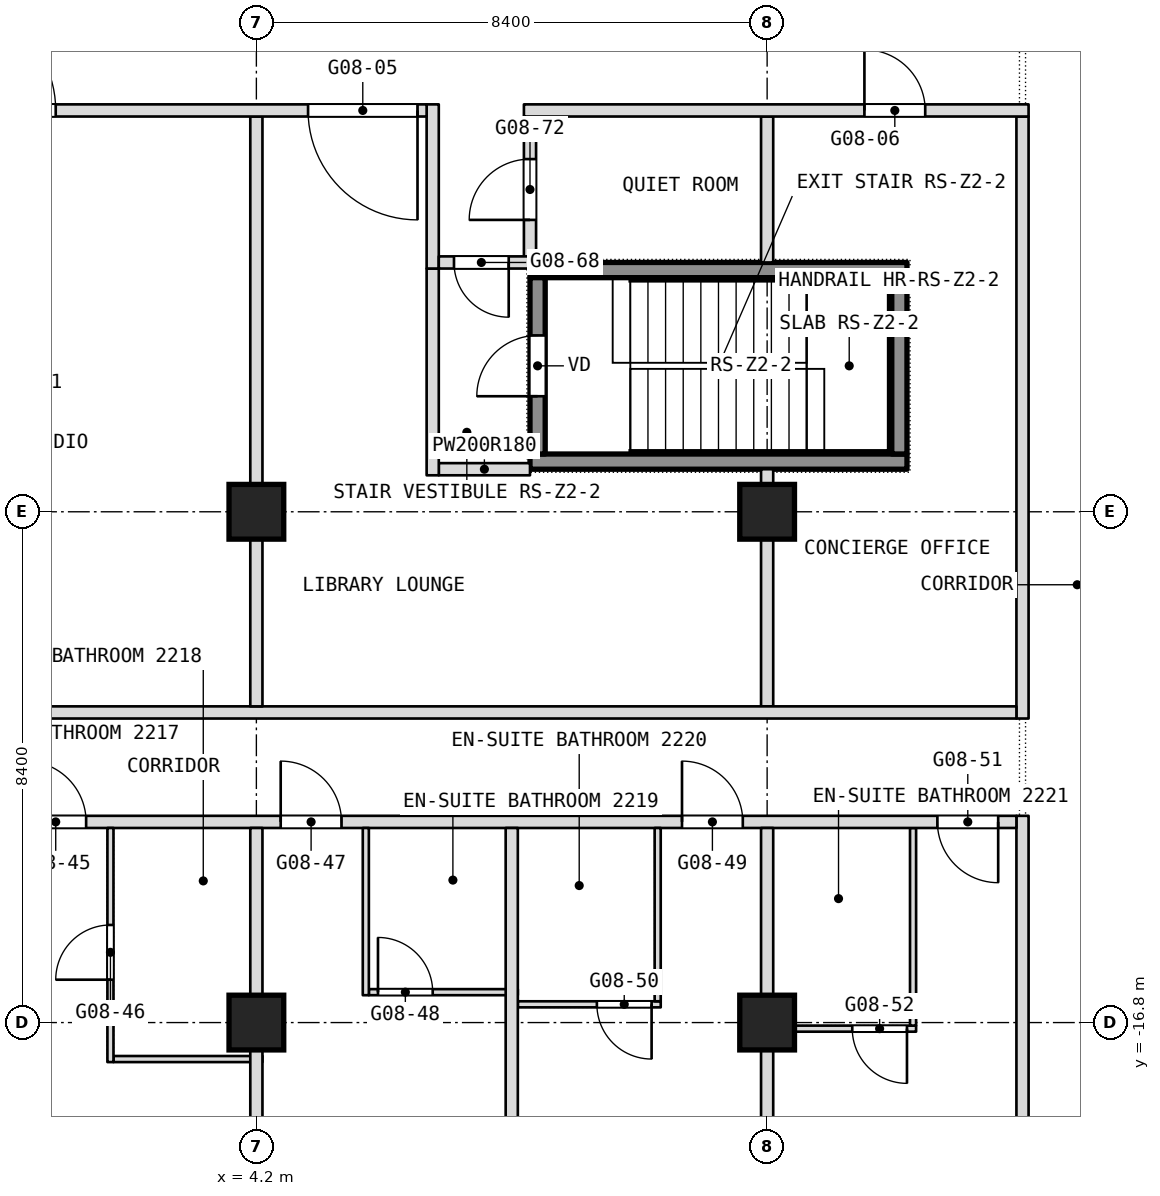
"""IFC4 building model, lengths in metres.
Left out: names, types, materials, properties, quantities, classifications, styles, units other than length and angle.
Written with IfcOpenShell. Run it as: python <this file> out.ifc"""

import sys

from ifc_helpers import new_model, si_unit, direction, frame, frame_2d, origin, origin_2d, place, context, subcontext, project, spatial, rectangle, extrude, element, fill, save


model = new_model("IFC4")
c1 = context("Model", 3, precision=1e-05, world=origin(), true_north=direction((0.0, 1.0)))
c2 = subcontext(c1, "Body", "Model", "MODEL_VIEW")
j1 = project(units=[si_unit("LENGTHUNIT", "METRE"), si_unit("PLANEANGLEUNIT", "RADIAN")], contexts=[c1])
p1 = place(None, origin())
s1 = spatial("IfcSite", under=j1, at=p1, CompositionType="ELEMENT")
p2 = place(p1, origin())
s2 = spatial("IfcBuilding", under=s1, at=p2, CompositionType="ELEMENT")
p3 = place(p2, frame((0.0, 0.0, 104.9)))
s3 = spatial("IfcBuildingStorey", under=s2, at=p3, CompositionType="ELEMENT", Elevation=104.9)
for number, where, z_axis, x_axis in (
    (1, (4.2, -16.8, 0.0), (0.0, 0.0, 1.0), (1.0, 0.0, 0.0)),
    (2, (4.2, -8.4, 0.0), (0.0, 0.0, 1.0), (1.0, 0.0, 0.0)),
    (3, (12.6, -16.8, 0.0), (0.0, 0.0, 1.0), (1.0, 0.0, 0.0)),
    (4, (12.6, -8.4, 0.0), (0.0, 0.0, 1.0), (1.0, 0.0, 0.0)),
):
    element("IfcColumn", number, at=place(p3, frame(where, z_axis=z_axis, x_axis=x_axis)), inside=s3, PredefinedType="COLUMN", context=c2, shape_type="SweptSolid", body=[
        extrude(rectangle(XDim=0.9, YDim=0.9, at=origin_2d()), origin(), (0.0, 0.0, 1.0), 3.6),
    ])
p4 = place(p3, frame((1.85, -17.4, 0.0), z_axis=(0.0, 0.0, 1.0), x_axis=(1.0, 0.0, 0.0)))
e5 = element("IfcWall", 5, at=p4, inside=s3, PredefinedType="PARTITIONING", context=c2, shape_type="SweptSolid", body=[
    extrude(rectangle(XDim=2.45, YDim=0.1, at=frame_2d((1.225, 0.0))), origin(), (0.0, 0.0, 1.0), 3.34),
])
p5 = place(p3, frame((12.7, -16.9, 0.0), z_axis=(0.0, 0.0, 1.0), x_axis=(1.0, 0.0, 0.0)))
e6 = element("IfcWall", 6, at=p5, inside=s3, PredefinedType="PARTITIONING", context=c2, shape_type="SweptSolid", body=[
    extrude(rectangle(XDim=2.35, YDim=0.1, at=frame_2d((1.175, 0.0))), origin(), (0.0, 0.0, 1.0), 2.89),
])
p6 = place(p5, frame((1.3, 0.0, 0.0)))
e7 = element("IfcOpeningElement", 7, at=p6, cuts=e6, PredefinedType="OPENING", context=c2, shape_type="SweptSolid", body=[
    extrude(rectangle(XDim=0.9, YDim=2.1, at=frame_2d((0.45, 1.05))), frame((0.0, 0.05, 0.0), z_axis=(0.0, -1.0, 0.0), x_axis=(1.0, 0.0, 0.0)), (0.0, 0.0, 1.0), 0.1),
])
p7 = place(p3, frame((16.8, -22.186, 0.0), z_axis=(0.0, 0.0, 1.0), x_axis=(0.0, 1.0, 0.0)))
e8 = element("IfcWall", 8, at=p7, inside=s3, PredefinedType="PARTITIONING", context=c2, shape_type="SweptSolid", body=[
    extrude(rectangle(XDim=8.786, YDim=0.2, at=frame_2d((4.393, 0.0))), origin(), (0.0, 0.0, 1.0), 3.34),
])
p8 = place(p3, frame((16.8, -11.8, 0.0), z_axis=(0.0, 0.0, 1.0), x_axis=(0.0, 1.0, 0.0)))
e9 = element("IfcWall", 9, at=p8, inside=s3, PredefinedType="PARTITIONING", context=c2, shape_type="SweptSolid", body=[
    extrude(rectangle(XDim=9.9, YDim=0.2, at=frame_2d((4.95, 0.0))), origin(), (0.0, 0.0, 1.0), 3.34),
])
p9 = place(p3, frame((8.5, -16.5, 0.0), z_axis=(0.0, 0.0, 1.0), x_axis=(1.0, 0.0, 0.0)))
e10 = element("IfcWall", 10, at=p9, inside=s3, PredefinedType="PARTITIONING", context=c2, shape_type="SweptSolid", body=[
    extrude(rectangle(XDim=2.35, YDim=0.1, at=frame_2d((1.175, 0.0))), origin(), (0.0, 0.0, 1.0), 3.34),
])
p10 = place(p9, frame((1.3, 0.0, 0.0)))
e11 = element("IfcOpeningElement", 11, at=p10, cuts=e10, PredefinedType="OPENING", context=c2, shape_type="SweptSolid", body=[
    extrude(rectangle(XDim=0.9, YDim=2.1, at=frame_2d((0.45, 1.05))), frame((0.0, 0.05, 0.0), z_axis=(0.0, -1.0, 0.0), x_axis=(1.0, 0.0, 0.0)), (0.0, 0.0, 1.0), 0.1),
])
p11 = place(p3, frame((6.05, -16.3, 0.0), z_axis=(0.0, 0.0, 1.0), x_axis=(1.0, 0.0, 0.0)))
e12 = element("IfcWall", 12, at=p11, inside=s3, PredefinedType="PARTITIONING", context=c2, shape_type="SweptSolid", body=[
    extrude(rectangle(XDim=2.45, YDim=0.1, at=frame_2d((1.225, 0.0))), origin(), (0.0, 0.0, 1.0), 3.34),
])
p12 = place(p11, frame((0.15, 0.0, 0.0)))
e13 = element("IfcOpeningElement", 13, at=p12, cuts=e12, PredefinedType="OPENING", context=c2, shape_type="SweptSolid", body=[
    extrude(rectangle(XDim=0.9, YDim=2.1, at=frame_2d((0.45, 1.05))), frame((0.0, 0.05, 0.0), z_axis=(0.0, -1.0, 0.0), x_axis=(1.0, 0.0, 0.0)), (0.0, 0.0, 1.0), 0.1),
])
p13 = place(p3, frame((15.0, -16.85, 0.0), z_axis=(0.0, 0.0, 1.0), x_axis=(0.0, 1.0, 0.0)))
e14 = element("IfcWall", 14, at=p13, inside=s3, PredefinedType="PARTITIONING", context=c2, shape_type="SweptSolid", body=[
    extrude(rectangle(XDim=3.25, YDim=0.1, at=frame_2d((1.625, 0.0))), origin(), (0.0, 0.0, 1.0), 3.34),
])
p14 = place(p3, frame((-3.2, -13.5, 0.0), z_axis=(0.0, 0.0, 1.0), x_axis=(1.0, 0.0, 0.0)))
e15 = element("IfcWall", 15, at=p14, inside=s3, PredefinedType="PARTITIONING", context=c2, shape_type="SweptSolid", body=[
    extrude(rectangle(XDim=19.9, YDim=0.2, at=frame_2d((9.95, 0.0))), origin(), (0.0, 0.0, 1.0), 3.34),
])
p15 = place(p14, frame((1.8, 0.0, 0.0)))
e16 = element("IfcOpeningElement", 16, at=p15, cuts=e15, PredefinedType="OPENING", context=c2, shape_type="SweptSolid", body=[
    extrude(rectangle(XDim=1.0, YDim=2.1, at=frame_2d((0.5, 1.05))), frame((0.0, 0.1, 0.0), z_axis=(0.0, -1.0, 0.0), x_axis=(1.0, 0.0, 0.0)), (0.0, 0.0, 1.0), 0.2),
])
p16 = place(p14, frame((3.6, 0.0, 0.0)))
e17 = element("IfcOpeningElement", 17, at=p16, cuts=e15, PredefinedType="OPENING", context=c2, shape_type="SweptSolid", body=[
    extrude(rectangle(XDim=1.0, YDim=2.1, at=frame_2d((0.5, 1.05))), frame((0.0, 0.1, 0.0), z_axis=(0.0, -1.0, 0.0), x_axis=(1.0, 0.0, 0.0)), (0.0, 0.0, 1.0), 0.2),
])
p17 = place(p14, frame((7.8, 0.0, 0.0)))
e18 = element("IfcOpeningElement", 18, at=p17, cuts=e15, PredefinedType="OPENING", context=c2, shape_type="SweptSolid", body=[
    extrude(rectangle(XDim=1.0, YDim=2.1, at=frame_2d((0.5, 1.05))), frame((0.0, 0.1, 0.0), z_axis=(0.0, -1.0, 0.0), x_axis=(1.0, 0.0, 0.0)), (0.0, 0.0, 1.0), 0.2),
])
p18 = place(p14, frame((14.4, 0.0, 0.0)))
e19 = element("IfcOpeningElement", 19, at=p18, cuts=e15, PredefinedType="OPENING", context=c2, shape_type="SweptSolid", body=[
    extrude(rectangle(XDim=1.0, YDim=2.1, at=frame_2d((0.5, 1.05))), frame((0.0, 0.1, 0.0), z_axis=(0.0, -1.0, 0.0), x_axis=(1.0, 0.0, 0.0)), (0.0, 0.0, 1.0), 0.2),
])
p19 = place(p14, frame((18.6, 0.0, 0.0)))
e20 = element("IfcOpeningElement", 20, at=p19, cuts=e15, PredefinedType="OPENING", context=c2, shape_type="SweptSolid", body=[
    extrude(rectangle(XDim=1.0, YDim=2.1, at=frame_2d((0.5, 1.05))), frame((0.0, 0.1, 0.0), z_axis=(0.0, -1.0, 0.0), x_axis=(1.0, 0.0, 0.0)), (0.0, 0.0, 1.0), 0.2),
])
p20 = place(p3, frame((12.6, -21.175, 0.0), z_axis=(0.0, 0.0, 1.0), x_axis=(0.0, 1.0, 0.0)))
e21 = element("IfcWall", 21, at=p20, inside=s3, PredefinedType="PARTITIONING", context=c2, shape_type="SweptSolid", body=[
    extrude(rectangle(XDim=7.575, YDim=0.2, at=frame_2d((3.788, 0.0))), origin(), (0.0, 0.0, 1.0), 3.34),
])
p21 = place(p3, frame((12.6, -11.6, 0.0), z_axis=(0.0, 0.0, 1.0), x_axis=(0.0, 1.0, 0.0)))
e22 = element("IfcWall", 22, at=p21, inside=s3, PredefinedType="PARTITIONING", context=c2, shape_type="SweptSolid", body=[
    extrude(rectangle(XDim=3.9, YDim=0.2, at=frame_2d((1.95, 0.0))), origin(), (0.0, 0.0, 1.0), 3.34),
])
p22 = place(p3, frame((12.6, -4.3, 0.0), z_axis=(0.0, 0.0, 1.0), x_axis=(0.0, 1.0, 0.0)))
e23 = element("IfcWall", 23, at=p22, inside=s3, PredefinedType="PARTITIONING", context=c2, shape_type="SweptSolid", body=[
    extrude(rectangle(XDim=2.4, YDim=0.2, at=frame_2d((1.2, 0.0))), origin(), (0.0, 0.0, 1.0), 3.34),
])
p23 = place(p3, frame((-4.1, -11.7, 0.0), z_axis=(0.0, 0.0, 1.0), x_axis=(1.0, 0.0, 0.0)))
e24 = element("IfcWall", 24, at=p23, inside=s3, PredefinedType="PARTITIONING", context=c2, shape_type="SweptSolid", body=[
    extrude(rectangle(XDim=20.8, YDim=0.2, at=frame_2d((10.4, 0.0))), origin(), (0.0, 0.0, 1.0), 3.34),
])
p24 = place(p3, frame((10.8, -16.45, 0.0), z_axis=(0.0, 0.0, 1.0), x_axis=(0.0, 1.0, 0.0)))
e25 = element("IfcWall", 25, at=p24, inside=s3, PredefinedType="PARTITIONING", context=c2, shape_type="SweptSolid", body=[
    extrude(rectangle(XDim=2.85, YDim=0.1, at=frame_2d((1.425, 0.0))), origin(), (0.0, 0.0, 1.0), 3.34),
])
p25 = place(p3, frame((8.7, -4.3, 0.0), z_axis=(0.0, 0.0, 1.0), x_axis=(0.0, 1.0, 0.0)))
e26 = element("IfcWall", 26, at=p25, inside=s3, PredefinedType="PARTITIONING", context=c2, shape_type="SweptSolid", body=[
    extrude(rectangle(XDim=2.4, YDim=0.2, at=frame_2d((1.2, 0.0))), origin(), (0.0, 0.0, 1.0), 3.34),
])
p26 = place(p25, frame((0.7, 0.0, 0.0)))
e27 = element("IfcOpeningElement", 27, at=p26, cuts=e26, PredefinedType="OPENING", context=c2, shape_type="SweptSolid", body=[
    extrude(rectangle(XDim=1.0, YDim=2.1, at=frame_2d((0.5, 1.05))), frame((0.0, 0.1, 0.0), z_axis=(0.0, -1.0, 0.0), x_axis=(1.0, 0.0, 0.0)), (0.0, 0.0, 1.0), 0.2),
])
p27 = place(p3, frame((8.4, -23.3, 0.0), z_axis=(0.0, 0.0, 1.0), x_axis=(0.0, 1.0, 0.0)))
e28 = element("IfcWall", 28, at=p27, inside=s3, PredefinedType="PARTITIONING", context=c2, shape_type="SweptSolid", body=[
    extrude(rectangle(XDim=9.7, YDim=0.2, at=frame_2d((4.85, 0.0))), origin(), (0.0, 0.0, 1.0), 3.34),
])
p28 = place(p3, frame((7.2, -7.7, 0.0), z_axis=(0.0, 0.0, 1.0), x_axis=(1.0, 0.0, 0.0)))
e29 = element("IfcWall", 29, at=p28, inside=s3, PredefinedType="PARTITIONING", context=c2, shape_type="SweptSolid", body=[
    extrude(rectangle(XDim=1.5, YDim=0.2, at=frame_2d((0.75, 0.0))), origin(), (0.0, 0.0, 1.0), 3.34),
])
p29 = place(p3, frame((7.1, -7.8, 0.0), z_axis=(0.0, 0.0, 1.0), x_axis=(0.0, 1.0, 0.0)))
e30 = element("IfcWall", 30, at=p29, inside=s3, PredefinedType="PARTITIONING", context=c2, shape_type="SweptSolid", body=[
    extrude(rectangle(XDim=3.4, YDim=0.2, at=frame_2d((1.7, 0.0))), origin(), (0.0, 0.0, 1.0), 3.34),
])
p30 = place(p3, frame((7.1, -4.4, 0.0), z_axis=(0.0, 0.0, 1.0), x_axis=(0.0, 1.0, 0.0)))
e31 = element("IfcWall", 31, at=p30, inside=s3, PredefinedType="PARTITIONING", context=c2, shape_type="SweptSolid", body=[
    extrude(rectangle(XDim=2.7, YDim=0.2, at=frame_2d((1.35, 0.0))), origin(), (0.0, 0.0, 1.0), 3.34),
])
p31 = place(p3, frame((6.0, -16.35, 0.0), z_axis=(0.0, 0.0, 1.0), x_axis=(0.0, 1.0, 0.0)))
e32 = element("IfcWall", 32, at=p31, inside=s3, PredefinedType="PARTITIONING", context=c2, shape_type="SweptSolid", body=[
    extrude(rectangle(XDim=2.75, YDim=0.1, at=frame_2d((1.375, 0.0))), origin(), (0.0, 0.0, 1.0), 3.34),
])
p32 = place(p3, frame((7.2, -4.3, 0.0), z_axis=(0.0, 0.0, 1.0), x_axis=(1.0, 0.0, 0.0)))
e33 = element("IfcWall", 33, at=p32, inside=s3, PredefinedType="PARTITIONING", context=c2, shape_type="SweptSolid", body=[
    extrude(rectangle(XDim=1.5, YDim=0.2, at=frame_2d((0.75, 0.0))), origin(), (0.0, 0.0, 1.0), 3.34),
])
p33 = place(p32, frame((0.25, 0.0, 0.0)))
e34 = element("IfcOpeningElement", 34, at=p33, cuts=e33, PredefinedType="OPENING", context=c2, shape_type="SweptSolid", body=[
    extrude(rectangle(XDim=0.9, YDim=2.1, at=frame_2d((0.45, 1.05))), frame((0.0, 0.1, 0.0), z_axis=(0.0, -1.0, 0.0), x_axis=(1.0, 0.0, 0.0)), (0.0, 0.0, 1.0), 0.2),
])
p34 = place(p3, frame((4.2, -23.3, 0.0), z_axis=(0.0, 0.0, 1.0), x_axis=(0.0, 1.0, 0.0)))
e35 = element("IfcWall", 35, at=p34, inside=s3, PredefinedType="PARTITIONING", context=c2, shape_type="SweptSolid", body=[
    extrude(rectangle(XDim=9.7, YDim=0.2, at=frame_2d((4.85, 0.0))), origin(), (0.0, 0.0, 1.0), 3.34),
])
p35 = place(p3, frame((4.2, -11.6, 0.0), z_axis=(0.0, 0.0, 1.0), x_axis=(0.0, 1.0, 0.0)))
e36 = element("IfcWall", 36, at=p35, inside=s3, PredefinedType="PARTITIONING", context=c2, shape_type="SweptSolid", body=[
    extrude(rectangle(XDim=9.7, YDim=0.2, at=frame_2d((4.85, 0.0))), origin(), (0.0, 0.0, 1.0), 3.34),
])
p36 = place(p3, frame((1.8, -17.45, 0.0), z_axis=(0.0, 0.0, 1.0), x_axis=(0.0, 1.0, 0.0)))
e37 = element("IfcWall", 37, at=p36, inside=s3, PredefinedType="PARTITIONING", context=c2, shape_type="SweptSolid", body=[
    extrude(rectangle(XDim=3.85, YDim=0.1, at=frame_2d((1.925, 0.0))), origin(), (0.0, 0.0, 1.0), 3.34),
])
p37 = place(p36, frame((1.355, 0.0, 0.0)))
e38 = element("IfcOpeningElement", 38, at=p37, cuts=e37, PredefinedType="OPENING", context=c2, shape_type="SweptSolid", body=[
    extrude(rectangle(XDim=0.9, YDim=2.1, at=frame_2d((0.45, 1.05))), frame((0.0, 0.05, 0.0), z_axis=(0.0, -1.0, 0.0), x_axis=(1.0, 0.0, 0.0)), (0.0, 0.0, 1.0), 0.1),
])
p38 = place(p3, frame((-4.3, -1.8, 0.0), z_axis=(0.0, 0.0, 1.0), x_axis=(1.0, 0.0, 0.0)))
e39 = element("IfcWall", 39, at=p38, inside=s3, PredefinedType="PARTITIONING", context=c2, shape_type="SweptSolid", body=[
    extrude(rectangle(XDim=11.3, YDim=0.2, at=frame_2d((5.65, 0.0))), origin(), (0.0, 0.0, 1.0), 3.34),
])
p39 = place(p38, frame((3.4, 0.0, 0.0)))
e40 = element("IfcOpeningElement", 40, at=p39, cuts=e39, PredefinedType="OPENING", context=c2, shape_type="SweptSolid", body=[
    extrude(rectangle(XDim=1.8, YDim=2.1, at=frame_2d((0.9, 1.05))), frame((0.0, 0.1, 0.0), z_axis=(0.0, -1.0, 0.0), x_axis=(1.0, 0.0, 0.0)), (0.0, 0.0, 1.0), 0.2),
])
p40 = place(p38, frame((9.35, 0.0, 0.0)))
e41 = element("IfcOpeningElement", 41, at=p40, cuts=e39, PredefinedType="OPENING", context=c2, shape_type="SweptSolid", body=[
    extrude(rectangle(XDim=1.8, YDim=2.1, at=frame_2d((0.9, 1.05))), frame((0.0, 0.1, 0.0), z_axis=(0.0, -1.0, 0.0), x_axis=(1.0, 0.0, 0.0)), (0.0, 0.0, 1.0), 0.2),
])
p41 = place(p3, frame((8.6, -1.8, 0.0), z_axis=(0.0, 0.0, 1.0), x_axis=(1.0, 0.0, 0.0)))
e42 = element("IfcWall", 42, at=p41, inside=s3, PredefinedType="PARTITIONING", context=c2, shape_type="SweptSolid", body=[
    extrude(rectangle(XDim=8.3, YDim=0.2, at=frame_2d((4.15, 0.0))), origin(), (0.0, 0.0, 1.0), 3.34),
])
p42 = place(p41, frame((5.6, 0.0, 0.0)))
e43 = element("IfcOpeningElement", 43, at=p42, cuts=e42, PredefinedType="OPENING", context=c2, shape_type="SweptSolid", body=[
    extrude(rectangle(XDim=1.0, YDim=2.1, at=frame_2d((0.5, 1.05))), frame((0.0, 0.1, 0.0), z_axis=(0.0, -1.0, 0.0), x_axis=(1.0, 0.0, 0.0)), (0.0, 0.0, 1.0), 0.2),
])
for number, where, z_axis, x_axis in (
    (44, (8.7, -7.575, 0.1), (0.0, 0.0, 1.0), (1.0, 0.0, 0.0)),
    (45, (8.7, -4.425, 0.1), (0.0, 0.0, 1.0), (1.0, 0.0, 0.0)),
):
    element("IfcWall", number, at=place(p3, frame(where, z_axis=z_axis, x_axis=x_axis)), inside=s3, PredefinedType="SHEAR", context=c2, shape_type="SweptSolid", body=[
        extrude(rectangle(XDim=6.2, YDim=0.25, at=frame_2d((3.1, 0.0))), origin(), (0.0, 0.0, 1.0), 3.6),
    ])
p43 = place(p3, frame((8.825, -7.45, 0.1), z_axis=(0.0, 0.0, 1.0), x_axis=(0.0, 1.0, 0.0)))
e46 = element("IfcWall", 46, at=p43, inside=s3, PredefinedType="SHEAR", context=c2, shape_type="SweptSolid", body=[
    extrude(rectangle(XDim=2.9, YDim=0.25, at=frame_2d((1.45, 0.0))), origin(), (0.0, 0.0, 1.0), 3.6),
])
p44 = place(p43, frame((0.95, 0.0, 0.0)))
e47 = element("IfcOpeningElement", 47, at=p44, cuts=e46, PredefinedType="OPENING", context=c2, shape_type="SweptSolid", body=[
    extrude(rectangle(XDim=1.0, YDim=2.1, at=frame_2d((0.5, 1.05))), frame((0.0, 0.125, 0.0), z_axis=(0.0, -1.0, 0.0), x_axis=(1.0, 0.0, 0.0)), (0.0, 0.0, 1.0), 0.25),
])
p45 = place(p3, frame((14.775, -7.45, 0.1), z_axis=(0.0, 0.0, 1.0), x_axis=(0.0, 1.0, 0.0)))
e48 = element("IfcWall", 48, at=p45, inside=s3, PredefinedType="SHEAR", context=c2, shape_type="SweptSolid", body=[
    extrude(rectangle(XDim=2.9, YDim=0.25, at=frame_2d((1.45, 0.0))), origin(), (0.0, 0.0, 1.0), 3.6),
])
p46 = place(p6, origin())
e49 = element("IfcDoor", 49, at=p46, inside=s3, OperationType="SINGLE_SWING_RIGHT", PredefinedType="DOOR", context=c2, shape_type="SweptSolid", body=[
    extrude(rectangle(XDim=0.9, YDim=2.1, at=frame_2d((0.45, 1.05))), frame((0.0, 0.025, 0.0), z_axis=(0.0, -1.0, 0.0), x_axis=(1.0, 0.0, 0.0)), (0.0, 0.0, 1.0), 0.05),
])
fill(e7, e49)
p47 = place(p10, origin())
e50 = element("IfcDoor", 50, at=p47, inside=s3, OperationType="SINGLE_SWING_RIGHT", PredefinedType="DOOR", context=c2, shape_type="SweptSolid", body=[
    extrude(rectangle(XDim=0.9, YDim=2.1, at=frame_2d((0.45, 1.05))), frame((0.0, 0.025, 0.0), z_axis=(0.0, -1.0, 0.0), x_axis=(1.0, 0.0, 0.0)), (0.0, 0.0, 1.0), 0.05),
])
fill(e11, e50)
p48 = place(p12, origin())
e51 = element("IfcDoor", 51, at=p48, inside=s3, OperationType="SINGLE_SWING_LEFT", PredefinedType="DOOR", context=c2, shape_type="SweptSolid", body=[
    extrude(rectangle(XDim=0.9, YDim=2.1, at=frame_2d((0.45, 1.05))), frame((0.0, 0.025, 0.0), z_axis=(0.0, -1.0, 0.0), x_axis=(1.0, 0.0, 0.0)), (0.0, 0.0, 1.0), 0.05),
])
fill(e13, e51)
p49 = place(p16, origin())
e52 = element("IfcDoor", 52, at=p49, inside=s3, OperationType="SINGLE_SWING_LEFT", PredefinedType="DOOR", context=c2, shape_type="SweptSolid", body=[
    extrude(rectangle(XDim=1.0, YDim=2.1, at=frame_2d((0.5, 1.05))), frame((0.0, 0.025, 0.0), z_axis=(0.0, -1.0, 0.0), x_axis=(1.0, 0.0, 0.0)), (0.0, 0.0, 1.0), 0.05),
])
fill(e17, e52)
p50 = place(p17, origin())
e53 = element("IfcDoor", 53, at=p50, inside=s3, OperationType="SINGLE_SWING_LEFT", PredefinedType="DOOR", context=c2, shape_type="SweptSolid", body=[
    extrude(rectangle(XDim=1.0, YDim=2.1, at=frame_2d((0.5, 1.05))), frame((0.0, 0.025, 0.0), z_axis=(0.0, -1.0, 0.0), x_axis=(1.0, 0.0, 0.0)), (0.0, 0.0, 1.0), 0.05),
])
fill(e18, e53)
p51 = place(p18, origin())
e54 = element("IfcDoor", 54, at=p51, inside=s3, OperationType="SINGLE_SWING_LEFT", PredefinedType="DOOR", context=c2, shape_type="SweptSolid", body=[
    extrude(rectangle(XDim=1.0, YDim=2.1, at=frame_2d((0.5, 1.05))), frame((0.0, 0.025, 0.0), z_axis=(0.0, -1.0, 0.0), x_axis=(1.0, 0.0, 0.0)), (0.0, 0.0, 1.0), 0.05),
])
fill(e19, e54)
p52 = place(p19, origin())
e55 = element("IfcDoor", 55, at=p52, inside=s3, OperationType="SINGLE_SWING_LEFT", PredefinedType="DOOR", context=c2, shape_type="SweptSolid", body=[
    extrude(rectangle(XDim=1.0, YDim=2.1, at=frame_2d((0.5, 1.05))), frame((0.0, 0.025, 0.0), z_axis=(0.0, -1.0, 0.0), x_axis=(1.0, 0.0, 0.0)), (0.0, 0.0, 1.0), 0.05),
])
fill(e20, e55)
p53 = place(p26, origin())
e56 = element("IfcDoor", 56, at=p53, inside=s3, OperationType="SINGLE_SWING_LEFT", PredefinedType="DOOR", context=c2, shape_type="SweptSolid", body=[
    extrude(rectangle(XDim=1.0, YDim=2.1, at=frame_2d((0.5, 1.05))), frame((0.0, 0.025, 0.0), z_axis=(0.0, -1.0, 0.0), x_axis=(1.0, 0.0, 0.0)), (0.0, 0.0, 1.0), 0.05),
])
fill(e27, e56)
p54 = place(p33, origin())
e57 = element("IfcDoor", 57, at=p54, inside=s3, OperationType="SINGLE_SWING_RIGHT", PredefinedType="DOOR", context=c2, shape_type="SweptSolid", body=[
    extrude(rectangle(XDim=0.9, YDim=2.1, at=frame_2d((0.45, 1.05))), frame((0.0, 0.025, 0.0), z_axis=(0.0, -1.0, 0.0), x_axis=(1.0, 0.0, 0.0)), (0.0, 0.0, 1.0), 0.05),
])
fill(e34, e57)
p55 = place(p37, origin())
e58 = element("IfcDoor", 58, at=p55, inside=s3, OperationType="SINGLE_SWING_RIGHT", PredefinedType="DOOR", context=c2, shape_type="SweptSolid", body=[
    extrude(rectangle(XDim=0.9, YDim=2.1, at=frame_2d((0.45, 1.05))), frame((0.0, 0.025, 0.0), z_axis=(0.0, -1.0, 0.0), x_axis=(1.0, 0.0, 0.0)), (0.0, 0.0, 1.0), 0.05),
])
fill(e38, e58)
p56 = place(p39, origin())
e59 = element("IfcDoor", 59, at=p56, inside=s3, OperationType="DOUBLE_DOOR_SINGLE_SWING", PredefinedType="DOOR", context=c2, shape_type="SweptSolid", body=[
    extrude(rectangle(XDim=1.8, YDim=2.1, at=frame_2d((0.9, 1.05))), frame((0.0, 0.025, 0.0), z_axis=(0.0, -1.0, 0.0), x_axis=(1.0, 0.0, 0.0)), (0.0, 0.0, 1.0), 0.05),
])
fill(e40, e59)
p57 = place(p40, origin())
e60 = element("IfcDoor", 60, at=p57, inside=s3, OperationType="DOUBLE_DOOR_SINGLE_SWING", PredefinedType="DOOR", context=c2, shape_type="SweptSolid", body=[
    extrude(rectangle(XDim=1.8, YDim=2.1, at=frame_2d((0.9, 1.05))), frame((0.0, 0.025, 0.0), z_axis=(0.0, -1.0, 0.0), x_axis=(1.0, 0.0, 0.0)), (0.0, 0.0, 1.0), 0.05),
])
fill(e41, e60)
p58 = place(p42, origin())
e61 = element("IfcDoor", 61, at=p58, inside=s3, OperationType="SINGLE_SWING_RIGHT", PredefinedType="DOOR", context=c2, shape_type="SweptSolid", body=[
    extrude(rectangle(XDim=1.0, YDim=2.1, at=frame_2d((0.5, 1.05))), frame((0.0, 0.025, 0.0), z_axis=(0.0, -1.0, 0.0), x_axis=(1.0, 0.0, 0.0)), (0.0, 0.0, 1.0), 0.05),
])
fill(e43, e61)
p59 = place(p44, origin())
e62 = element("IfcDoor", 62, at=p59, inside=s3, OperationType="SINGLE_SWING_LEFT", PredefinedType="DOOR", context=c2, shape_type="SweptSolid", body=[
    extrude(rectangle(XDim=1.0, YDim=2.1, at=frame_2d((0.5, 1.05))), frame((0.0, 0.025, 0.0), z_axis=(0.0, -1.0, 0.0), x_axis=(1.0, 0.0, 0.0)), (0.0, 0.0, 1.0), 0.05),
])
fill(e47, e62)
save(model, sys.argv[1])
